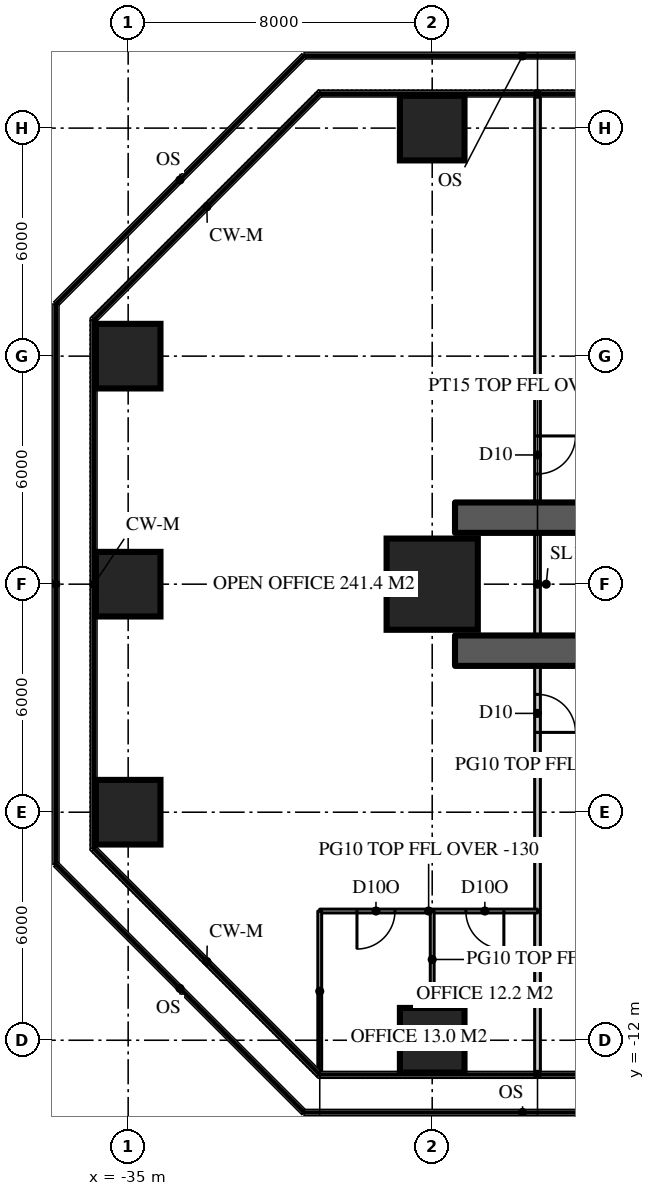
"""IFC4 building model, lengths in metres.
Left out: names, types, materials, properties, quantities, classifications, styles, units other than length and angle.
Written with IfcOpenShell. Run it as: python <this file> out.ifc"""

import sys

from ifc_helpers import new_model, si_unit, direction, frame, frame_2d, origin, origin_2d, place, context, subcontext, project, spatial, rectangle, extrude, element, fill, save


model = new_model("IFC4")
c1 = context("Model", 3, precision=1e-05, world=origin(), true_north=direction((0.0, 1.0)))
c2 = subcontext(c1, "Body", "Model", "MODEL_VIEW")
j1 = project(units=[si_unit("LENGTHUNIT", "METRE"), si_unit("PLANEANGLEUNIT", "RADIAN")], contexts=[c1])
p1 = place(None, origin())
s1 = spatial("IfcSite", under=j1, at=p1, CompositionType="ELEMENT")
p2 = place(p1, origin())
s2 = spatial("IfcBuilding", under=s1, at=p2, CompositionType="ELEMENT")
p3 = place(p2, frame((0.0, 0.0, 139.8)))
s3 = spatial("IfcBuildingStorey", under=s2, at=p3, CompositionType="ELEMENT", Elevation=139.8)
for number, where, z_axis, x_axis in (
    (1, (-11.15, 1.75, 0.0), (0.0, 0.0, 1.0), (-1.0, 0.0, 0.0)),
    (2, (-11.15, -1.75, 0.0), (0.0, 0.0, 1.0), (-1.0, 0.0, 0.0)),
):
    element("IfcWall", number, at=place(p3, frame(where, z_axis=z_axis, x_axis=x_axis)), inside=s3, PredefinedType="SHEAR", context=c2, shape_type="SweptSolid", body=[
        extrude(rectangle(XDim=15.25, YDim=0.8, at=frame_2d((7.625, 0.0))), origin(), (0.0, 0.0, 1.0), 3.9),
    ])
for number, where, z_axis, x_axis in (
    (3, (-27.0, -12.0, 0.0), (0.0, 0.0, 1.0), (1.0, 0.0, 0.0)),
    (4, (-35.0, -6.0, 0.0), (0.0, 0.0, 1.0), (1.0, 0.0, 0.0)),
    (5, (-35.0, 0.0, 0.0), (0.0, 0.0, 1.0), (1.0, 0.0, 0.0)),
):
    element("IfcColumn", number, at=place(p3, frame(where, z_axis=z_axis, x_axis=x_axis)), inside=s3, PredefinedType="COLUMN", context=c2, shape_type="SweptSolid", body=[
        extrude(rectangle(XDim=1.7, YDim=1.7, at=origin_2d()), origin(), (0.0, 0.0, 1.0), 3.9),
    ])
p4 = place(p3, frame((-27.0, 0.0, 0.0), z_axis=(0.0, 0.0, 1.0), x_axis=(1.0, 0.0, 0.0)))
e6 = element("IfcColumn", 6, at=p4, inside=s3, PredefinedType="COLUMN", context=c2, shape_type="SweptSolid", body=[
    extrude(rectangle(XDim=2.4, YDim=2.4, at=origin_2d()), origin(), (0.0, 0.0, 1.0), 3.9),
])
for number, where, z_axis, x_axis in (
    (7, (-35.0, 6.0, 0.0), (0.0, 0.0, 1.0), (1.0, 0.0, 0.0)),
    (8, (-27.0, 12.0, 0.0), (0.0, 0.0, 1.0), (1.0, 0.0, 0.0)),
):
    element("IfcColumn", number, at=place(p3, frame(where, z_axis=z_axis, x_axis=x_axis)), inside=s3, PredefinedType="COLUMN", context=c2, shape_type="SweptSolid", body=[
        extrude(rectangle(XDim=1.7, YDim=1.7, at=origin_2d()), origin(), (0.0, 0.0, 1.0), 3.9),
    ])
p5 = place(p3, frame((-24.229, 12.82, 0.0), z_axis=(0.0, 0.0, 1.0), x_axis=(0.0, -1.0, 0.0)))
e9 = element("IfcWall", 9, at=p5, inside=s3, PredefinedType="PARTITIONING", context=c2, shape_type="SweptSolid", body=[
    extrude(rectangle(XDim=25.64, YDim=0.15, at=frame_2d((12.82, 0.0))), origin(), (0.0, 0.0, 1.0), 3.77),
])
p6 = place(p5, frame((15.72, 0.0, 0.0)))
e10 = element("IfcOpeningElement", 10, at=p6, cuts=e9, PredefinedType="OPENING", context=c2, shape_type="SweptSolid", body=[
    extrude(rectangle(XDim=1.0, YDim=2.2, at=frame_2d((0.5, 1.1))), frame((0.0, 0.085, 0.0), z_axis=(0.0, -1.0, 0.0), x_axis=(1.0, 0.0, 0.0)), (0.0, 0.0, 1.0), 0.17),
])
p7 = place(p5, frame((8.92, 0.0, 0.0)))
e11 = element("IfcOpeningElement", 11, at=p7, cuts=e9, PredefinedType="OPENING", context=c2, shape_type="SweptSolid", body=[
    extrude(rectangle(XDim=1.0, YDim=2.2, at=frame_2d((0.5, 1.1))), frame((0.0, 0.085, 0.0), z_axis=(0.0, -1.0, 0.0), x_axis=(1.0, 0.0, 0.0)), (0.0, 0.0, 1.0), 0.17),
])
p8 = place(p3, frame((-24.229, -8.6, 0.0), z_axis=(0.0, 0.0, 1.0), x_axis=(-1.0, 0.0, 0.0)))
e12 = element("IfcWall", 12, at=p8, inside=s3, PredefinedType="PARTITIONING", context=c2, shape_type="SweptSolid", body=[
    extrude(rectangle(XDim=5.73, YDim=0.1, at=frame_2d((2.865, 0.0))), origin(), (0.0, 0.0, 1.0), 3.77),
])
p9 = place(p8, frame((0.885, 0.0, 0.0)))
e13 = element("IfcOpeningElement", 13, at=p9, cuts=e12, PredefinedType="OPENING", context=c2, shape_type="SweptSolid", body=[
    extrude(rectangle(XDim=1.0, YDim=2.2, at=frame_2d((0.5, 1.1))), frame((0.0, 0.06, 0.0), z_axis=(0.0, -1.0, 0.0), x_axis=(1.0, 0.0, 0.0)), (0.0, 0.0, 1.0), 0.12),
])
p10 = place(p8, frame((3.75, 0.0, 0.0)))
e14 = element("IfcOpeningElement", 14, at=p10, cuts=e12, PredefinedType="OPENING", context=c2, shape_type="SweptSolid", body=[
    extrude(rectangle(XDim=1.0, YDim=2.2, at=frame_2d((0.5, 1.1))), frame((0.0, 0.06, 0.0), z_axis=(0.0, -1.0, 0.0), x_axis=(1.0, 0.0, 0.0)), (0.0, 0.0, 1.0), 0.12),
])
p11 = place(p3, frame((-27.0, -8.6, 0.0), z_axis=(0.0, 0.0, 1.0), x_axis=(0.0, -1.0, 0.0)))
e15 = element("IfcWall", 15, at=p11, inside=s3, PredefinedType="PARTITIONING", context=c2, shape_type="SweptSolid", body=[
    extrude(rectangle(XDim=2.55, YDim=0.1, at=frame_2d((1.275, 0.0))), origin(), (0.0, 0.0, 1.0), 2.97),
])
p12 = place(p3, frame((-29.959, -8.6, 0.0), z_axis=(0.0, 0.0, 1.0), x_axis=(0.0, -1.0, 0.0)))
e16 = element("IfcWall", 16, at=p12, inside=s3, PredefinedType="PARTITIONING", context=c2, shape_type="SweptSolid", body=[
    extrude(rectangle(XDim=4.22, YDim=0.1, at=frame_2d((2.11, 0.0))), origin(), (0.0, 0.0, 1.0), 3.77),
])
p13 = place(p6, origin())
e17 = element("IfcDoor", 17, at=p13, inside=s3, OperationType="SINGLE_SWING_RIGHT", PredefinedType="DOOR", context=c2, shape_type="SweptSolid", body=[
    extrude(rectangle(XDim=1.0, YDim=2.2, at=frame_2d((0.5, 1.1))), frame((0.0, 0.025, 0.0), z_axis=(0.0, -1.0, 0.0), x_axis=(1.0, 0.0, 0.0)), (0.0, 0.0, 1.0), 0.05),
])
fill(e10, e17)
p14 = place(p7, origin())
e18 = element("IfcDoor", 18, at=p14, inside=s3, OperationType="SINGLE_SWING_LEFT", PredefinedType="DOOR", context=c2, shape_type="SweptSolid", body=[
    extrude(rectangle(XDim=1.0, YDim=2.2, at=frame_2d((0.5, 1.1))), frame((0.0, 0.025, 0.0), z_axis=(0.0, -1.0, 0.0), x_axis=(1.0, 0.0, 0.0)), (0.0, 0.0, 1.0), 0.05),
])
fill(e11, e18)
p15 = place(p9, origin())
e19 = element("IfcDoor", 19, at=p15, inside=s3, OperationType="SINGLE_SWING_LEFT", PredefinedType="DOOR", context=c2, shape_type="SweptSolid", body=[
    extrude(rectangle(XDim=1.0, YDim=2.2, at=frame_2d((0.5, 1.1))), frame((0.0, 0.025, 0.0), z_axis=(0.0, -1.0, 0.0), x_axis=(1.0, 0.0, 0.0)), (0.0, 0.0, 1.0), 0.05),
])
fill(e13, e19)
p16 = place(p10, origin())
e20 = element("IfcDoor", 20, at=p16, inside=s3, OperationType="SINGLE_SWING_RIGHT", PredefinedType="DOOR", context=c2, shape_type="SweptSolid", body=[
    extrude(rectangle(XDim=1.0, YDim=2.2, at=frame_2d((0.5, 1.1))), frame((0.0, 0.025, 0.0), z_axis=(0.0, -1.0, 0.0), x_axis=(1.0, 0.0, 0.0)), (0.0, 0.0, 1.0), 0.05),
])
fill(e14, e20)
save(model, sys.argv[1])
